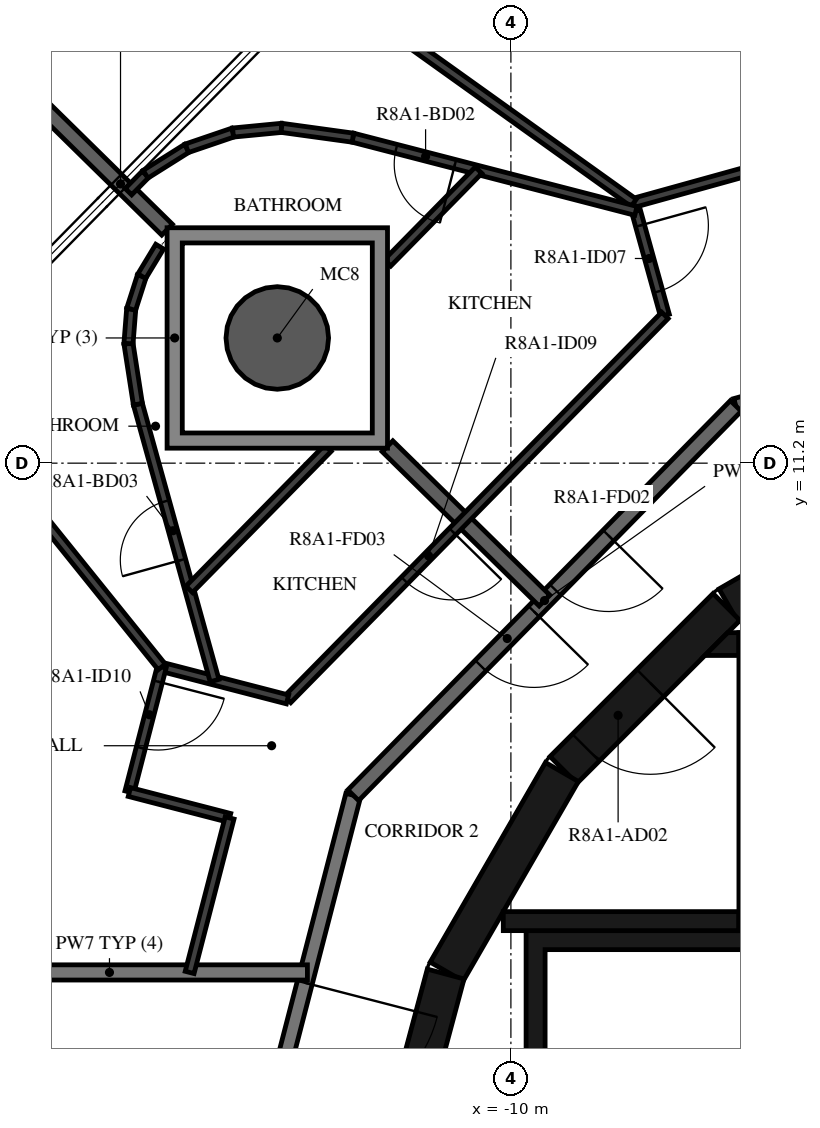
"""IFC4 building model, lengths in metres.
Left out: names, types, materials, properties, quantities, classifications, styles, units other than length and angle.
Written with IfcOpenShell. Run it as: python <this file> out.ifc"""

import sys

from ifc_helpers import new_model, si_unit, direction, frame, frame_2d, origin, origin_2d, place, context, subcontext, project, spatial, polyline, rectangle, hollow_circle, outline, extrude, element, fill, save


model = new_model("IFC4")
c1 = context("Model", 3, precision=1e-05, world=origin(), true_north=direction((0.0, 1.0)))
c2 = subcontext(c1, "Body", "Model", "MODEL_VIEW")
j1 = project(units=[si_unit("LENGTHUNIT", "METRE"), si_unit("PLANEANGLEUNIT", "RADIAN")], contexts=[c1])
p1 = place(None, origin())
s1 = spatial("IfcSite", under=j1, at=p1, CompositionType="ELEMENT")
p2 = place(p1, origin())
s2 = spatial("IfcBuilding", under=s1, at=p2, CompositionType="ELEMENT")
p3 = place(p2, frame((0.0, 0.0, 301.7)))
s3 = spatial("IfcBuildingStorey", under=s2, at=p3, CompositionType="ELEMENT", Elevation=301.7)
p4 = place(p3, frame((-13.073, 12.847, -0.38), z_axis=(0.0, 0.0, 1.0), x_axis=(1.0, 0.0, 0.0)))
e1 = element("IfcColumn", 1, at=p4, inside=s3, PredefinedType="COLUMN", context=c2, shape_type="SweptSolid", body=[
    extrude(hollow_circle(Radius=0.675, WallThickness=0.03, at=origin_2d()), origin(), (0.0, 0.0, 1.0), 3.5),
])
p5 = place(p3, frame((-4.51, 10.845, 0.0), z_axis=(0.0, 0.0, 1.0), x_axis=(-0.865975092491, -0.500087131594, 0.0)))
e2 = element("IfcWall", 2, at=p5, inside=s3, PredefinedType="SHEAR", context=c2, shape_type="SweptSolid", body=[
    extrude(rectangle(XDim=3.033, YDim=0.5, at=frame_2d((1.516, 0.0))), origin(), (0.0, 0.0, 1.0), 3.12),
])
p6 = place(p3, frame((-7.164, 9.308, 0.0), z_axis=(0.0, 0.0, 1.0), x_axis=(-0.707106781187, -0.707106781187, 0.0)))
e3 = element("IfcWall", 3, at=p6, inside=s3, PredefinedType="SHEAR", context=c2, shape_type="SweptSolid", body=[
    extrude(rectangle(XDim=3.032, YDim=0.5, at=frame_2d((1.516, 0.0))), origin(), (0.0, 0.0, 1.0), 3.12),
])
p7 = place(p6, frame((1.416, 0.0, 0.0)))
e4 = element("IfcOpeningElement", 4, at=p7, cuts=e3, PredefinedType="OPENING", context=c2, shape_type="SweptSolid", body=[
    extrude(rectangle(XDim=1.2, YDim=2.1, at=frame_2d((0.6, 1.05))), frame((0.0, 0.26, 0.0), z_axis=(0.0, -1.0, 0.0), x_axis=(1.0, 0.0, 0.0)), (0.0, 0.0, 1.0), 0.52),
])
for number, where, z_axis, x_axis in (
    (5, (-9.329, 7.137, 0.0), (0.0, 0.0, 1.0), (-0.5, -0.866, 0.0)),
    (6, (-10.858, 4.479, 0.0), (0.0, 0.0, 1.0), (-0.259, -0.966, 0.0)),
):
    element("IfcWall", number, at=place(p3, frame(where, z_axis=z_axis, x_axis=x_axis)), inside=s3, PredefinedType="SHEAR", context=c2, shape_type="SweptSolid", body=[
        extrude(rectangle(XDim=3.033, YDim=0.5, at=frame_2d((1.516, 0.0))), origin(), (0.0, 0.0, 1.0), 3.12),
    ])
p8 = place(p3, frame((-6.875, 8.97, 0.0), z_axis=(0.0, 0.0, 1.0), x_axis=(0.0, -1.0, 0.0)))
e7 = element("IfcWall", 7, at=p8, inside=s3, PredefinedType="SHEAR", context=c2, shape_type="SweptSolid", body=[
    extrude(rectangle(XDim=3.92, YDim=0.25, at=frame_2d((1.96, 0.0))), origin(), (0.0, 0.0, 1.0), 3.12),
])
p9 = place(p8, frame((1.61, 0.0, 0.0)))
e8 = element("IfcOpeningElement", 8, at=p9, cuts=e7, PredefinedType="OPENING", context=c2, shape_type="SweptSolid", body=[
    extrude(rectangle(XDim=1.2, YDim=2.1, at=frame_2d((0.6, 1.05))), frame((0.0, 0.135, 0.0), z_axis=(0.0, -1.0, 0.0), x_axis=(1.0, 0.0, 0.0)), (0.0, 0.0, 1.0), 0.27),
])
p10 = place(p3, frame((-7.0, 5.175, 0.0), z_axis=(0.0, 0.0, 1.0), x_axis=(-1.0, 0.0, 0.0)))
e9 = element("IfcWall", 9, at=p10, inside=s3, PredefinedType="SHEAR", context=c2, shape_type="SweptSolid", body=[
    extrude(rectangle(XDim=3.1, YDim=0.25, at=frame_2d((1.55, 0.0))), origin(), (0.0, 0.0, 1.0), 3.12),
])
p11 = place(p3, origin())
e10 = element("IfcWall", 10, at=p11, inside=s3, PredefinedType="SHEAR", context=c2, shape_type="SweptSolid", body=[
    extrude(outline(polyline([(-7.148, 8.97), (-7.0, 8.97), (-7.0, 8.67), (-7.448, 8.67), (-7.148, 8.97)])), origin(), (0.0, 0.0, 1.0), 3.12),
])
p12 = place(p3, origin())
e11 = element("IfcWall", 11, at=p12, inside=s3, PredefinedType="SHEAR", context=c2, shape_type="SweptSolid", body=[
    extrude(outline(polyline([(-9.8, 1.9), (-9.55, 1.9), (-9.55, 4.8), (-1.2, 4.8), (-1.2, 1.9), (-0.95, 1.9), (-0.95, 4.8), (3.1, 4.8), (3.1, 1.9), (3.35, 1.9), (3.35, 4.8), (5.25, 4.8), (5.25, 1.9), (5.5, 1.9), (5.5, 4.8), (7.4, 4.8), (7.4, 1.9), (7.65, 1.9), (7.65, 4.8), (9.55, 4.8), (9.55, 1.9), (9.8, 1.9), (9.8, 4.8), (9.8, 5.05), (-9.8, 5.05), (-9.8, 4.8), (-9.8, 1.9)])), origin(), (0.0, 0.0, 1.0), 3.12),
])
p13 = place(p3, frame((-0.121, 13.872, 0.0), z_axis=(0.0, 0.0, 1.0), x_axis=(-0.963625960674, -0.267254575108, 0.0)))
e12 = element("IfcWall", 12, at=p13, inside=s3, PredefinedType="STANDARD", context=c2, shape_type="SweptSolid", body=[
    extrude(rectangle(XDim=7.181, YDim=0.2, at=frame_2d((3.591, 0.0))), origin(), (0.0, 0.0, 1.0), 3.12),
])
p14 = place(p3, frame((-12.074, 6.831, 0.0), z_axis=(0.0, 0.0, 1.0), x_axis=(-0.250391063186, -0.968144780225, 0.0)))
e13 = element("IfcWall", 13, at=p14, inside=s3, PredefinedType="STANDARD", context=c2, shape_type="SweptSolid", body=[
    extrude(rectangle(XDim=7.181, YDim=0.2, at=frame_2d((3.591, 0.0))), origin(), (0.0, 0.0, 1.0), 3.12),
])
p15 = place(p14, frame((2.548, 0.0, 0.0)))
e14 = element("IfcOpeningElement", 14, at=p15, cuts=e13, PredefinedType="OPENING", context=c2, shape_type="SweptSolid", body=[
    extrude(rectangle(XDim=1.8, YDim=2.1, at=frame_2d((0.9, 1.05))), frame((0.0, 0.11, 0.0), z_axis=(0.0, -1.0, 0.0), x_axis=(1.0, 0.0, 0.0)), (0.0, 0.0, 1.0), 0.22),
])
p16 = place(p3, frame((-7.041, 11.953, 0.0), z_axis=(0.0, 0.0, 1.0), x_axis=(-0.70090916255, -0.713250549143, 0.0)))
e15 = element("IfcWall", 15, at=p16, inside=s3, PredefinedType="STANDARD", context=c2, shape_type="SweptSolid", body=[
    extrude(rectangle(XDim=7.181, YDim=0.2, at=frame_2d((3.59, 0.0))), origin(), (0.0, 0.0, 1.0), 3.12),
])
p17 = place(p16, frame((2.39, 0.0, 0.0)))
e16 = element("IfcOpeningElement", 16, at=p17, cuts=e15, PredefinedType="OPENING", context=c2, shape_type="SweptSolid", body=[
    extrude(rectangle(XDim=1.0, YDim=2.1, at=frame_2d((0.5, 1.05))), frame((0.0, 0.11, 0.0), z_axis=(0.0, -1.0, 0.0), x_axis=(1.0, 0.0, 0.0)), (0.0, 0.0, 1.0), 0.22),
])
p18 = place(p16, frame((3.791, 0.0, 0.0)))
e17 = element("IfcOpeningElement", 17, at=p18, cuts=e15, PredefinedType="OPENING", context=c2, shape_type="SweptSolid", body=[
    extrude(rectangle(XDim=1.0, YDim=2.1, at=frame_2d((0.5, 1.05))), frame((0.0, 0.11, 0.0), z_axis=(0.0, -1.0, 0.0), x_axis=(1.0, 0.0, 0.0)), (0.0, 0.0, 1.0), 0.22),
])
p19 = place(p3, frame((-12.677, 4.5, 0.0), z_axis=(0.0, 0.0, 1.0), x_axis=(-1.0, 0.0, 0.0)))
e18 = element("IfcWall", 18, at=p19, inside=s3, PredefinedType="STANDARD", context=c2, shape_type="SweptSolid", body=[
    extrude(rectangle(XDim=5.208, YDim=0.2, at=frame_2d((2.604, 0.0))), origin(), (0.0, 0.0, 1.0), 3.12),
])
p20 = place(p3, frame((-11.623, 11.422, 0.0), z_axis=(0.0, 0.0, 1.0), x_axis=(0.713233657229, -0.700926351478, 0.0)))
e19 = element("IfcWall", 19, at=p20, inside=s3, PredefinedType="STANDARD", context=c2, shape_type="SweptSolid", body=[
    extrude(rectangle(XDim=2.896, YDim=0.2, at=frame_2d((1.448, 0.0))), origin(), (0.0, 0.0, 1.0), 3.12),
])
p21 = place(p3, frame((-18.741, 18.417, 0.0), z_axis=(0.0, 0.0, 1.0), x_axis=(0.713252414586, -0.700907264256, 0.0)))
e20 = element("IfcWall", 20, at=p21, inside=s3, PredefinedType="STANDARD", context=c2, shape_type="SweptSolid", body=[
    extrude(rectangle(XDim=5.913, YDim=0.2, at=frame_2d((2.957, 0.0))), origin(), (0.0, 0.0, 1.0), 3.12),
])
p22 = place(p3, frame((-6.746, 15.079, 0.0), z_axis=(0.0, 0.0, 1.0), x_axis=(-0.963624820233, -0.267258687102, 0.0)))
e21 = element("IfcWall", 21, at=p22, inside=s3, PredefinedType="PARTITIONING", context=c2, shape_type="SweptSolid", body=[
    extrude(rectangle(XDim=1.7, YDim=0.12, at=frame_2d((0.85, 0.0))), origin(), (0.0, 0.0, 1.0), 3.12),
])
p23 = place(p3, frame((-8.355, 14.519, 0.0), z_axis=(0.0, 0.0, 1.0), x_axis=(0.267052638692, -0.963681943469, 0.0)))
e22 = element("IfcWall", 22, at=p23, inside=s3, PredefinedType="PARTITIONING", context=c2, shape_type="SweptSolid", body=[
    extrude(rectangle(XDim=1.427, YDim=0.12, at=frame_2d((0.713, 0.0))), origin(), (0.0, 0.0, 1.0), 3.12),
])
p24 = place(p23, frame((0.2, 0.0, 0.0)))
e23 = element("IfcOpeningElement", 23, at=p24, cuts=e22, PredefinedType="OPENING", context=c2, shape_type="SweptSolid", body=[
    extrude(rectangle(XDim=0.9, YDim=2.1, at=frame_2d((0.45, 1.05))), frame((0.0, 0.07, 0.0), z_axis=(0.0, -1.0, 0.0), x_axis=(1.0, 0.0, 0.0)), (0.0, 0.0, 1.0), 0.14),
])
p25 = place(p3, frame((-7.974, 13.144, 0.0), z_axis=(0.0, 0.0, 1.0), x_axis=(-0.700910366085, -0.713249366432, 0.0)))
e24 = element("IfcWall", 24, at=p25, inside=s3, PredefinedType="PARTITIONING", context=c2, shape_type="SweptSolid", body=[
    extrude(rectangle(XDim=7.083, YDim=0.12, at=frame_2d((3.542, 0.0))), origin(), (0.0, 0.0, 1.0), 3.12),
])
p26 = place(p25, frame((3.986, 0.0, 0.0)))
e25 = element("IfcOpeningElement", 25, at=p26, cuts=e24, PredefinedType="OPENING", context=c2, shape_type="SweptSolid", body=[
    extrude(rectangle(XDim=0.9, YDim=2.1, at=frame_2d((0.45, 1.05))), frame((0.0, 0.07, 0.0), z_axis=(0.0, -1.0, 0.0), x_axis=(1.0, 0.0, 0.0)), (0.0, 0.0, 1.0), 0.14),
])
p27 = place(p3, frame((-16.165, 20.188, 0.0), z_axis=(0.0, 0.0, 1.0), x_axis=(0.813459166979, -0.581622028175, 0.0)))
e26 = element("IfcWall", 26, at=p27, inside=s3, PredefinedType="PARTITIONING", context=c2, shape_type="SweptSolid", body=[
    extrude(rectangle(XDim=9.565, YDim=0.12, at=frame_2d((4.782, 0.0))), origin(), (0.0, 0.0, 1.0), 3.12),
])
p28 = place(p27, frame((0.5, 0.0, 0.0)))
e27 = element("IfcOpeningElement", 27, at=p28, cuts=e26, PredefinedType="OPENING", context=c2, shape_type="SweptSolid", body=[
    extrude(rectangle(XDim=0.9, YDim=2.1, at=frame_2d((0.45, 1.05))), frame((0.0, 0.07, 0.0), z_axis=(0.0, -1.0, 0.0), x_axis=(1.0, 0.0, 0.0)), (0.0, 0.0, 1.0), 0.14),
])
p29 = place(p3, frame((-8.355, 14.519, 0.0), z_axis=(0.0, 0.0, 1.0), x_axis=(-0.968146911612, 0.250382821969, 0.0)))
e28 = element("IfcWall", 28, at=p29, inside=s3, PredefinedType="PARTITIONING", context=c2, shape_type="SweptSolid", body=[
    extrude(rectangle(XDim=3.847, YDim=0.12, at=frame_2d((1.923, 0.0))), origin(), (0.0, 0.0, 1.0), 3.12),
])
p30 = place(p29, frame((2.458, 0.0, 0.0)))
e29 = element("IfcOpeningElement", 29, at=p30, cuts=e28, PredefinedType="OPENING", context=c2, shape_type="SweptSolid", body=[
    extrude(rectangle(XDim=0.8, YDim=2.1, at=frame_2d((0.4, 1.05))), frame((0.0, 0.07, 0.0), z_axis=(0.0, -1.0, 0.0), x_axis=(1.0, 0.0, 0.0)), (0.0, 0.0, 1.0), 0.14),
])
p31 = place(p3, frame((-10.425, 15.054, 0.0), z_axis=(0.0, 0.0, 1.0), x_axis=(-0.700866383264, -0.713292585698, 0.0)))
e30 = element("IfcWall", 30, at=p31, inside=s3, PredefinedType="PARTITIONING", context=c2, shape_type="SweptSolid", body=[
    extrude(rectangle(XDim=1.709, YDim=0.12, at=frame_2d((0.854, 0.0))), origin(), (0.0, 0.0, 1.0), 3.12),
])
p32 = place(p3, frame((-15.032, 14.772, 0.0), z_axis=(0.0, 0.0, 1.0), x_axis=(0.701378407906, 0.712789119532, 0.0)))
e31 = element("IfcWall", 31, at=p32, inside=s3, PredefinedType="PARTITIONING", context=c2, shape_type="SweptSolid", body=[
    extrude(rectangle(XDim=0.321, YDim=0.12, at=frame_2d((0.161, 0.0))), origin(), (0.0, 0.0, 1.0), 3.12),
])
p33 = place(p3, frame((-14.807, 15.0, 0.0), z_axis=(0.0, 0.0, 1.0), x_axis=(0.846499451836, 0.532389592349, 0.0)))
e32 = element("IfcWall", 32, at=p33, inside=s3, PredefinedType="PARTITIONING", context=c2, shape_type="SweptSolid", body=[
    extrude(rectangle(XDim=0.642, YDim=0.12, at=frame_2d((0.321, 0.0))), origin(), (0.0, 0.0, 1.0), 3.12),
])
for number, where, z_axis, x_axis in (
    (33, (-14.263, 15.342, 0.0), (0.0, 0.0, 1.0), (0.946, 0.323, 0.0)),
    (34, (-13.656, 15.55, 0.0), (0.0, 0.0, 1.0), (0.995, 0.096, 0.0)),
):
    element("IfcWall", number, at=place(p3, frame(where, z_axis=z_axis, x_axis=x_axis)), inside=s3, PredefinedType="PARTITIONING", context=c2, shape_type="SweptSolid", body=[
        extrude(rectangle(XDim=0.642, YDim=0.12, at=frame_2d((0.321, 0.0))), origin(), (0.0, 0.0, 1.0), 3.12),
    ])
p34 = place(p3, frame((-13.017, 15.611, 0.0), z_axis=(0.0, 0.0, 1.0), x_axis=(0.990688406717, -0.136148745119, 0.0)))
e35 = element("IfcWall", 35, at=p34, inside=s3, PredefinedType="PARTITIONING", context=c2, shape_type="SweptSolid", body=[
    extrude(rectangle(XDim=0.947, YDim=0.12, at=frame_2d((0.473, 0.0))), origin(), (0.0, 0.0, 1.0), 3.12),
])
p35 = place(p3, frame((-12.939, 8.092, 0.0), z_axis=(0.0, 0.0, 1.0), x_axis=(-0.968179141411, 0.250258166974, 0.0)))
e36 = element("IfcWall", 36, at=p35, inside=s3, PredefinedType="PARTITIONING", context=c2, shape_type="SweptSolid", body=[
    extrude(rectangle(XDim=1.709, YDim=0.12, at=frame_2d((0.854, 0.0))), origin(), (0.0, 0.0, 1.0), 3.12),
])
p36 = place(p3, frame((-14.594, 8.519, 0.0), z_axis=(0.0, 0.0, 1.0), x_axis=(-0.250468695288, -0.968124698931, 0.0)))
e37 = element("IfcWall", 37, at=p36, inside=s3, PredefinedType="PARTITIONING", context=c2, shape_type="SweptSolid", body=[
    extrude(rectangle(XDim=1.7, YDim=0.12, at=frame_2d((0.85, 0.0))), origin(), (0.0, 0.0, 1.0), 3.12),
])
p37 = place(p36, frame((0.2, 0.0, 0.0)))
e38 = element("IfcOpeningElement", 38, at=p37, cuts=e37, PredefinedType="OPENING", context=c2, shape_type="SweptSolid", body=[
    extrude(rectangle(XDim=0.9, YDim=2.1, at=frame_2d((0.45, 1.05))), frame((0.0, 0.07, 0.0), z_axis=(0.0, -1.0, 0.0), x_axis=(1.0, 0.0, 0.0)), (0.0, 0.0, 1.0), 0.14),
])
p38 = place(p3, frame((-15.019, 6.874, 0.0), z_axis=(0.0, 0.0, 1.0), x_axis=(0.968182114673, -0.250246663967, 0.0)))
e39 = element("IfcWall", 39, at=p38, inside=s3, PredefinedType="PARTITIONING", context=c2, shape_type="SweptSolid", body=[
    extrude(rectangle(XDim=1.362, YDim=0.12, at=frame_2d((0.681, 0.0))), origin(), (0.0, 0.0, 1.0), 3.12),
])
p39 = place(p3, frame((-13.701, 6.533, 0.0), z_axis=(0.0, 0.0, 1.0), x_axis=(-0.250352755349, -0.968154686963, 0.0)))
e40 = element("IfcWall", 40, at=p39, inside=s3, PredefinedType="PARTITIONING", context=c2, shape_type="SweptSolid", body=[
    extrude(rectangle(XDim=2.1, YDim=0.12, at=frame_2d((1.05, 0.0))), origin(), (0.0, 0.0, 1.0), 3.12),
])
p40 = place(p3, frame((-13.899, 8.34, 0.0), z_axis=(0.0, 0.0, 1.0), x_axis=(-0.267286775597, 0.963617029525, 0.0)))
e41 = element("IfcWall", 41, at=p40, inside=s3, PredefinedType="PARTITIONING", context=c2, shape_type="SweptSolid", body=[
    extrude(rectangle(XDim=3.773, YDim=0.12, at=frame_2d((1.887, 0.0))), origin(), (0.0, 0.0, 1.0), 3.12),
])
p41 = place(p40, frame((1.646, 0.0, 0.0)))
e42 = element("IfcOpeningElement", 42, at=p41, cuts=e41, PredefinedType="OPENING", context=c2, shape_type="SweptSolid", body=[
    extrude(rectangle(XDim=0.8, YDim=2.1, at=frame_2d((0.4, 1.05))), frame((0.0, 0.07, 0.0), z_axis=(0.0, -1.0, 0.0), x_axis=(1.0, 0.0, 0.0)), (0.0, 0.0, 1.0), 0.14),
])
p42 = place(p3, frame((-14.907, 11.976, 0.0), z_axis=(0.0, 0.0, 1.0), x_axis=(-0.153398456533, 0.988164416245, 0.0)))
e43 = element("IfcWall", 43, at=p42, inside=s3, PredefinedType="PARTITIONING", context=c2, shape_type="SweptSolid", body=[
    extrude(rectangle(XDim=0.807, YDim=0.12, at=frame_2d((0.403, 0.0))), origin(), (0.0, 0.0, 1.0), 3.12),
])
for number, where, z_axis, x_axis in (
    (44, (-15.031, 12.773, 0.0), (0.0, 0.0, 1.0), (0.078, 0.997, 0.0)),
    (45, (-14.995, 13.227, 0.0), (0.0, 0.0, 1.0), (0.306, 0.952, 0.0)),
    (46, (-14.856, 13.66, 0.0), (0.0, 0.0, 1.0), (0.518, 0.855, 0.0)),
):
    element("IfcWall", number, at=place(p3, frame(where, z_axis=z_axis, x_axis=x_axis)), inside=s3, PredefinedType="PARTITIONING", context=c2, shape_type="SweptSolid", body=[
        extrude(rectangle(XDim=0.455, YDim=0.12, at=frame_2d((0.228, 0.0))), origin(), (0.0, 0.0, 1.0), 3.12),
    ])
p43 = place(p3, frame((-20.466, 15.812, 0.0), z_axis=(0.0, 0.0, 1.0), x_axis=(0.62719424473, -0.77886287585, 0.0)))
e47 = element("IfcWall", 47, at=p43, inside=s3, PredefinedType="PARTITIONING", context=c2, shape_type="SweptSolid", body=[
    extrude(rectangle(XDim=9.364, YDim=0.12, at=frame_2d((4.682, 0.0))), origin(), (0.0, 0.0, 1.0), 3.12),
])
p44 = place(p43, frame((0.5, 0.0, 0.0)))
e48 = element("IfcOpeningElement", 48, at=p44, cuts=e47, PredefinedType="OPENING", context=c2, shape_type="SweptSolid", body=[
    extrude(rectangle(XDim=0.9, YDim=2.1, at=frame_2d((0.45, 1.05))), frame((0.0, 0.07, 0.0), z_axis=(0.0, -1.0, 0.0), x_axis=(1.0, 0.0, 0.0)), (0.0, 0.0, 1.0), 0.14),
])
p45 = place(p3, frame((-14.232, 9.54, 0.0), z_axis=(0.0, 0.0, 1.0), x_axis=(0.700890401548, 0.713268985038, 0.0)))
e49 = element("IfcWall", 49, at=p45, inside=s3, PredefinedType="PARTITIONING", context=c2, shape_type="SweptSolid", body=[
    extrude(rectangle(XDim=2.604, YDim=0.12, at=frame_2d((1.302, 0.0))), origin(), (0.0, 0.0, 1.0), 3.12),
])
p46 = place(p3, origin())
e50 = element("IfcWall", 50, at=p46, inside=s3, PredefinedType="STANDARD", context=c2, shape_type="SweptSolid", body=[
    extrude(outline(polyline([(-11.623, 14.297), (-11.623, 11.397), (-14.523, 11.397), (-14.523, 14.297), (-11.623, 14.297)]), holes=[polyline([(-14.323, 11.597), (-11.823, 11.597), (-11.823, 14.097), (-14.323, 14.097), (-14.323, 11.597)])]), origin(), (0.0, 0.0, 1.0), 3.12),
])
p47 = place(p7, origin())
e51 = element("IfcDoor", 51, at=p47, inside=s3, OperationType="SINGLE_SWING_RIGHT", PredefinedType="DOOR", context=c2, shape_type="SweptSolid", body=[
    extrude(rectangle(XDim=1.2, YDim=2.1, at=frame_2d((0.6, 1.05))), frame((0.0, 0.025, 0.0), z_axis=(0.0, -1.0, 0.0), x_axis=(1.0, 0.0, 0.0)), (0.0, 0.0, 1.0), 0.05),
])
fill(e4, e51)
p48 = place(p17, origin())
e52 = element("IfcDoor", 52, at=p48, inside=s3, OperationType="SINGLE_SWING_RIGHT", PredefinedType="DOOR", context=c2, shape_type="SweptSolid", body=[
    extrude(rectangle(XDim=1.0, YDim=2.1, at=frame_2d((0.5, 1.05))), frame((0.0, 0.025, 0.0), z_axis=(0.0, -1.0, 0.0), x_axis=(1.0, 0.0, 0.0)), (0.0, 0.0, 1.0), 0.05),
])
fill(e16, e52)
p49 = place(p24, origin())
e53 = element("IfcDoor", 53, at=p49, inside=s3, OperationType="SINGLE_SWING_LEFT", PredefinedType="DOOR", context=c2, shape_type="SweptSolid", body=[
    extrude(rectangle(XDim=0.9, YDim=2.1, at=frame_2d((0.45, 1.05))), frame((0.0, 0.025, 0.0), z_axis=(0.0, -1.0, 0.0), x_axis=(1.0, 0.0, 0.0)), (0.0, 0.0, 1.0), 0.05),
])
fill(e23, e53)
p50 = place(p30, origin())
e54 = element("IfcDoor", 54, at=p50, inside=s3, OperationType="SINGLE_SWING_LEFT", PredefinedType="DOOR", context=c2, shape_type="SweptSolid", body=[
    extrude(rectangle(XDim=0.8, YDim=2.1, at=frame_2d((0.4, 1.05))), frame((0.0, 0.025, 0.0), z_axis=(0.0, -1.0, 0.0), x_axis=(1.0, 0.0, 0.0)), (0.0, 0.0, 1.0), 0.05),
])
fill(e29, e54)
p51 = place(p18, origin())
e55 = element("IfcDoor", 55, at=p51, inside=s3, OperationType="SINGLE_SWING_LEFT", PredefinedType="DOOR", context=c2, shape_type="SweptSolid", body=[
    extrude(rectangle(XDim=1.0, YDim=2.1, at=frame_2d((0.5, 1.05))), frame((0.0, 0.025, 0.0), z_axis=(0.0, -1.0, 0.0), x_axis=(1.0, 0.0, 0.0)), (0.0, 0.0, 1.0), 0.05),
])
fill(e17, e55)
p52 = place(p26, origin())
e56 = element("IfcDoor", 56, at=p52, inside=s3, OperationType="SINGLE_SWING_LEFT", PredefinedType="DOOR", context=c2, shape_type="SweptSolid", body=[
    extrude(rectangle(XDim=0.9, YDim=2.1, at=frame_2d((0.45, 1.05))), frame((0.0, 0.025, 0.0), z_axis=(0.0, -1.0, 0.0), x_axis=(1.0, 0.0, 0.0)), (0.0, 0.0, 1.0), 0.05),
])
fill(e25, e56)
p53 = place(p37, origin())
e57 = element("IfcDoor", 57, at=p53, inside=s3, OperationType="SINGLE_SWING_LEFT", PredefinedType="DOOR", context=c2, shape_type="SweptSolid", body=[
    extrude(rectangle(XDim=0.9, YDim=2.1, at=frame_2d((0.45, 1.05))), frame((0.0, 0.025, 0.0), z_axis=(0.0, -1.0, 0.0), x_axis=(1.0, 0.0, 0.0)), (0.0, 0.0, 1.0), 0.05),
])
fill(e38, e57)
p54 = place(p41, origin())
e58 = element("IfcDoor", 58, at=p54, inside=s3, OperationType="SINGLE_SWING_RIGHT", PredefinedType="DOOR", context=c2, shape_type="SweptSolid", body=[
    extrude(rectangle(XDim=0.8, YDim=2.1, at=frame_2d((0.4, 1.05))), frame((0.0, 0.025, 0.0), z_axis=(0.0, -1.0, 0.0), x_axis=(1.0, 0.0, 0.0)), (0.0, 0.0, 1.0), 0.05),
])
fill(e42, e58)
p55 = place(p15, origin())
e59 = element("IfcDoor", 59, at=p55, inside=s3, OperationType="DOUBLE_DOOR_SINGLE_SWING", PredefinedType="DOOR", context=c2, shape_type="SweptSolid", body=[
    extrude(rectangle(XDim=1.8, YDim=2.1, at=frame_2d((0.9, 1.05))), frame((0.0, 0.025, 0.0), z_axis=(0.0, -1.0, 0.0), x_axis=(1.0, 0.0, 0.0)), (0.0, 0.0, 1.0), 0.05),
])
fill(e14, e59)
save(model, sys.argv[1])
